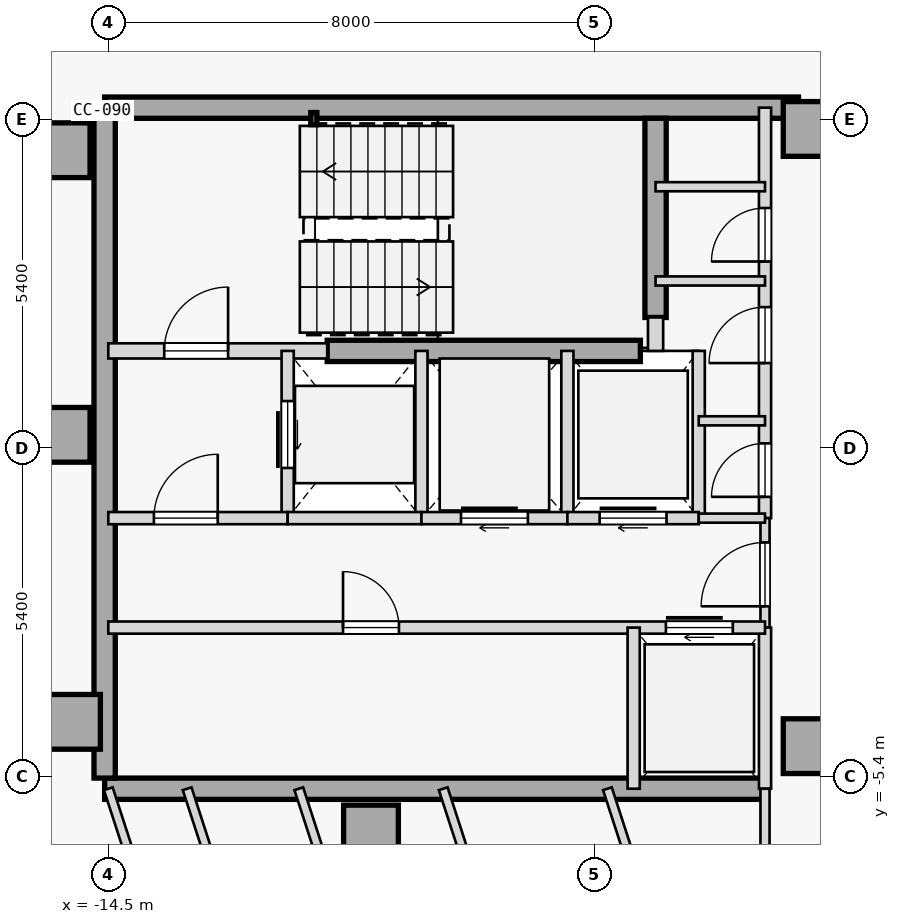
"""IFC4 building model, lengths in metres.
Left out: names, types, materials, properties, quantities, classifications, styles, units other than length and angle.
Written with IfcOpenShell. Run it as: python <this file> out.ifc"""

import sys

from ifc_helpers import new_model, si_unit, direction, frame, frame_2d, origin, origin_2d, place, context, subcontext, project, spatial, rectangle, hollow_rectangle, extrude, element, fill, save


model = new_model("IFC4")
c1 = context("Model", 3, precision=1e-05, world=origin(), true_north=direction((0.0, 1.0)))
c2 = subcontext(c1, "Body", "Model", "MODEL_VIEW")
j1 = project(units=[si_unit("LENGTHUNIT", "METRE"), si_unit("PLANEANGLEUNIT", "RADIAN")], contexts=[c1])
p1 = place(None, origin())
s1 = spatial("IfcSite", under=j1, at=p1, CompositionType="ELEMENT")
p2 = place(p1, origin())
s2 = spatial("IfcBuilding", under=s1, at=p2, CompositionType="ELEMENT")
p3 = place(p2, frame((0.0, 0.0, 224.3)))
s3 = spatial("IfcBuildingStorey", under=s2, at=p3, CompositionType="ELEMENT", Elevation=224.3)
for number, where, z_axis, x_axis in (
    (1, (-15.25, 4.9, 0.0), (0.0, 0.0, 1.0), (1.0, 0.0, 0.0)),
    (2, (-15.25, 0.22, 0.0), (0.0, 0.0, 1.0), (1.0, 0.0, 0.0)),
    (3, (-15.08, -4.5, 0.0), (0.0, 0.0, 1.0), (1.0, 0.0, 0.0)),
    (4, (-10.18, -6.32, 0.0), (0.0, 0.0, 1.0), (1.0, 0.0, 0.0)),
    (5, (-2.95, -4.9, 0.0), (0.0, 0.0, 1.0), (1.0, 0.0, 0.0)),
    (6, (-2.95, 5.25, 0.0), (0.0, 0.0, 1.0), (1.0, 0.0, 0.0)),
):
    element("IfcColumn", number, at=place(p3, frame(where, z_axis=z_axis, x_axis=x_axis)), inside=s3, PredefinedType="COLUMN", context=c2, shape_type="SweptSolid", body=[
        extrude(rectangle(XDim=0.9, YDim=0.9, at=origin_2d()), origin(), (0.0, 0.0, 1.0), 3.35),
    ])
p4 = place(p3, frame((-14.56, 5.6, 0.0), z_axis=(0.0, 0.0, 1.0), x_axis=(1.0, 0.0, 0.0)))
e7 = element("IfcWall", 7, at=p4, inside=s3, PredefinedType="SHEAR", context=c2, shape_type="SweptSolid", body=[
    extrude(rectangle(XDim=11.41, YDim=0.35, at=frame_2d((5.705, 0.0))), origin(), (0.0, 0.0, 1.0), 3.125),
])
p5 = place(p3, frame((-14.56, -5.6, 0.0), z_axis=(0.0, 0.0, 1.0), x_axis=(1.0, 0.0, 0.0)))
e8 = element("IfcWall", 8, at=p5, inside=s3, PredefinedType="SHEAR", context=c2, shape_type="SweptSolid", body=[
    extrude(rectangle(XDim=10.86, YDim=0.35, at=frame_2d((5.43, 0.0))), origin(), (0.0, 0.0, 1.0), 3.125),
])
p6 = place(p3, frame((-14.56, -5.425, 0.0), z_axis=(0.0, 0.0, 1.0), x_axis=(0.0, 1.0, 0.0)))
e9 = element("IfcWall", 9, at=p6, inside=s3, PredefinedType="SHEAR", context=c2, shape_type="SweptSolid", body=[
    extrude(rectangle(XDim=10.85, YDim=0.35, at=frame_2d((5.425, 0.0))), origin(), (0.0, 0.0, 1.0), 3.125),
])
p7 = place(p3, frame((-5.5, 2.15, 0.0), z_axis=(0.0, 0.0, 1.0), x_axis=(0.0, 1.0, 0.0)))
e10 = element("IfcWall", 10, at=p7, inside=s3, PredefinedType="SHEAR", context=c2, shape_type="SweptSolid", body=[
    extrude(rectangle(XDim=3.275, YDim=0.35, at=frame_2d((1.638, 0.0))), origin(), (0.0, 0.0, 1.0), 3.125),
])
p8 = place(p3, frame((-10.9, 1.6, 0.0), z_axis=(0.0, 0.0, 1.0), x_axis=(1.0, 0.0, 0.0)))
e11 = element("IfcWall", 11, at=p8, inside=s3, PredefinedType="SHEAR", context=c2, shape_type="SweptSolid", body=[
    extrude(rectangle(XDim=5.15, YDim=0.35, at=frame_2d((2.575, 0.0))), origin(), (0.0, 0.0, 1.0), 3.125),
])
p9 = place(p3, frame((-11.12, 5.42, 0.0), z_axis=(0.0, 0.0, 1.0), x_axis=(1.0, 0.0, 0.0)))
e12 = element("IfcColumn", 12, at=p9, inside=s3, PredefinedType="COLUMN", context=c2, shape_type="SweptSolid", body=[
    extrude(hollow_rectangle(XDim=0.1, YDim=0.2, WallThickness=0.008, at=origin_2d()), origin(), (0.0, 0.0, 1.0), 3.35),
])
p10 = place(p3, frame((-14.5, 1.6, 0.0), z_axis=(0.0, 0.0, 1.0), x_axis=(1.0, 0.0, 0.0)))
e13 = element("IfcWall", 13, at=p10, inside=s3, PredefinedType="STANDARD", context=c2, shape_type="SweptSolid", body=[
    extrude(rectangle(XDim=3.6, YDim=0.25, at=frame_2d((1.8, 0.0))), origin(), (0.0, 0.0, 1.0), 3.125),
])
p11 = place(p10, frame((0.92, 0.0, 0.0)))
e14 = element("IfcOpeningElement", 14, at=p11, cuts=e13, PredefinedType="OPENING", context=c2, shape_type="SweptSolid", body=[
    extrude(rectangle(XDim=1.05, YDim=2.15, at=frame_2d((0.525, 1.075))), frame((0.0, 0.135, 0.0), z_axis=(0.0, -1.0, 0.0), x_axis=(1.0, 0.0, 0.0)), (0.0, 0.0, 1.0), 0.27),
])
p12 = place(p3, frame((-5.5, 1.6, 0.0), z_axis=(0.0, 0.0, 1.0), x_axis=(0.0, 1.0, 0.0)))
e15 = element("IfcWall", 15, at=p12, inside=s3, PredefinedType="STANDARD", context=c2, shape_type="SweptSolid", body=[
    extrude(rectangle(XDim=0.55, YDim=0.25, at=frame_2d((0.275, 0.0))), origin(), (0.0, 0.0, 1.0), 3.125),
])
p13 = place(p3, frame((-3.7, -1.15, 0.0), z_axis=(0.0, 0.0, 1.0), x_axis=(0.0, 1.0, 0.0)))
e16 = element("IfcWall", 16, at=p13, inside=s3, PredefinedType="STANDARD", context=c2, shape_type="SweptSolid", body=[
    extrude(rectangle(XDim=6.75, YDim=0.2, at=frame_2d((3.375, 0.0))), origin(), (0.0, 0.0, 1.0), 3.125),
])
p14 = place(p13, frame((0.35, 0.0, 0.0)))
e17 = element("IfcOpeningElement", 17, at=p14, cuts=e16, PredefinedType="OPENING", context=c2, shape_type="SweptSolid", body=[
    extrude(rectangle(XDim=0.88, YDim=2.15, at=frame_2d((0.44, 1.075))), frame((0.0, 0.11, 0.0), z_axis=(0.0, -1.0, 0.0), x_axis=(1.0, 0.0, 0.0)), (0.0, 0.0, 1.0), 0.22),
])
p15 = place(p13, frame((2.55, 0.0, 0.0)))
e18 = element("IfcOpeningElement", 18, at=p15, cuts=e16, PredefinedType="OPENING", context=c2, shape_type="SweptSolid", body=[
    extrude(rectangle(XDim=0.92, YDim=2.15, at=frame_2d((0.46, 1.075))), frame((0.0, 0.11, 0.0), z_axis=(0.0, -1.0, 0.0), x_axis=(1.0, 0.0, 0.0)), (0.0, 0.0, 1.0), 0.22),
])
p16 = place(p13, frame((4.22, 0.0, 0.0)))
e19 = element("IfcOpeningElement", 19, at=p16, cuts=e16, PredefinedType="OPENING", context=c2, shape_type="SweptSolid", body=[
    extrude(rectangle(XDim=0.88, YDim=2.15, at=frame_2d((0.44, 1.075))), frame((0.0, 0.11, 0.0), z_axis=(0.0, -1.0, 0.0), x_axis=(1.0, 0.0, 0.0)), (0.0, 0.0, 1.0), 0.22),
])
p17 = place(p3, frame((-3.7, -2.95, 0.0), z_axis=(0.0, 0.0, 1.0), x_axis=(0.0, 1.0, 0.0)))
e20 = element("IfcWall", 20, at=p17, inside=s3, PredefinedType="PARTITIONING", context=c2, shape_type="SweptSolid", body=[
    extrude(rectangle(XDim=1.8, YDim=0.15, at=frame_2d((0.9, 0.0))), origin(), (0.0, 0.0, 1.0), 3.125),
])
p18 = place(p17, frame((0.35, 0.0, 0.0)))
e21 = element("IfcOpeningElement", 21, at=p18, cuts=e20, PredefinedType="OPENING", context=c2, shape_type="SweptSolid", body=[
    extrude(rectangle(XDim=1.05, YDim=2.18, at=frame_2d((0.525, 1.09))), frame((0.0, 0.085, 0.0), z_axis=(0.0, -1.0, 0.0), x_axis=(1.0, 0.0, 0.0)), (0.0, 0.0, 1.0), 0.17),
])
p19 = place(p3, frame((-3.7, -5.6, 0.0), z_axis=(0.0, 0.0, 1.0), x_axis=(0.0, 1.0, 0.0)))
e22 = element("IfcWall", 22, at=p19, inside=s3, PredefinedType="STANDARD", context=c2, shape_type="SweptSolid", body=[
    extrude(rectangle(XDim=2.65, YDim=0.2, at=frame_2d((1.325, 0.0))), origin(), (0.0, 0.0, 1.0), 3.125),
])
p20 = place(p3, frame((-11.55, -1.15, 0.0), z_axis=(0.0, 0.0, 1.0), x_axis=(0.0, 1.0, 0.0)))
e23 = element("IfcWall", 23, at=p20, inside=s3, PredefinedType="STANDARD", context=c2, shape_type="SweptSolid", body=[
    extrude(rectangle(XDim=2.75, YDim=0.2, at=frame_2d((1.375, 0.0))), origin(), (0.0, 0.0, 1.0), 3.125),
])
p21 = place(p20, frame((0.825, 0.0, 0.0)))
e24 = element("IfcOpeningElement", 24, at=p21, cuts=e23, PredefinedType="OPENING", context=c2, shape_type="SweptSolid", body=[
    extrude(rectangle(XDim=1.1, YDim=2.15, at=frame_2d((0.55, 1.075))), frame((0.0, 0.11, 0.0), z_axis=(0.0, -1.0, 0.0), x_axis=(1.0, 0.0, 0.0)), (0.0, 0.0, 1.0), 0.22),
])
p22 = place(p3, frame((-9.35, -1.15, 0.0), z_axis=(0.0, 0.0, 1.0), x_axis=(0.0, 1.0, 0.0)))
e25 = element("IfcWall", 25, at=p22, inside=s3, PredefinedType="STANDARD", context=c2, shape_type="SweptSolid", body=[
    extrude(rectangle(XDim=2.75, YDim=0.2, at=frame_2d((1.375, 0.0))), origin(), (0.0, 0.0, 1.0), 3.125),
])
p23 = place(p3, frame((-14.5, -1.15, 0.0), z_axis=(0.0, 0.0, 1.0), x_axis=(1.0, 0.0, 0.0)))
e26 = element("IfcWall", 26, at=p23, inside=s3, PredefinedType="STANDARD", context=c2, shape_type="SweptSolid", body=[
    extrude(rectangle(XDim=2.95, YDim=0.2, at=frame_2d((1.475, 0.0))), origin(), (0.0, 0.0, 1.0), 3.125),
])
p24 = place(p23, frame((0.75, 0.0, 0.0)))
e27 = element("IfcOpeningElement", 27, at=p24, cuts=e26, PredefinedType="OPENING", context=c2, shape_type="SweptSolid", body=[
    extrude(rectangle(XDim=1.05, YDim=2.18, at=frame_2d((0.525, 1.09))), frame((0.0, 0.11, 0.0), z_axis=(0.0, -1.0, 0.0), x_axis=(1.0, 0.0, 0.0)), (0.0, 0.0, 1.0), 0.22),
])
p25 = place(p3, frame((-11.55, -1.15, 0.0), z_axis=(0.0, 0.0, 1.0), x_axis=(1.0, 0.0, 0.0)))
e28 = element("IfcWall", 28, at=p25, inside=s3, PredefinedType="STANDARD", context=c2, shape_type="SweptSolid", body=[
    extrude(rectangle(XDim=2.2, YDim=0.2, at=frame_2d((1.1, 0.0))), origin(), (0.0, 0.0, 1.0), 3.125),
])
p26 = place(p3, frame((-6.95, -1.15, 0.0), z_axis=(0.0, 0.0, 1.0), x_axis=(0.0, 1.0, 0.0)))
e29 = element("IfcWall", 29, at=p26, inside=s3, PredefinedType="STANDARD", context=c2, shape_type="SweptSolid", body=[
    extrude(rectangle(XDim=2.75, YDim=0.2, at=frame_2d((1.375, 0.0))), origin(), (0.0, 0.0, 1.0), 3.125),
])
p27 = place(p3, frame((-9.35, -1.15, 0.0), z_axis=(0.0, 0.0, 1.0), x_axis=(1.0, 0.0, 0.0)))
e30 = element("IfcWall", 30, at=p27, inside=s3, PredefinedType="STANDARD", context=c2, shape_type="SweptSolid", body=[
    extrude(rectangle(XDim=2.4, YDim=0.2, at=frame_2d((1.2, 0.0))), origin(), (0.0, 0.0, 1.0), 3.125),
])
p28 = place(p27, frame((0.65, 0.0, 0.0)))
e31 = element("IfcOpeningElement", 31, at=p28, cuts=e30, PredefinedType="OPENING", context=c2, shape_type="SweptSolid", body=[
    extrude(rectangle(XDim=1.1, YDim=2.15, at=frame_2d((0.55, 1.075))), frame((0.0, 0.11, 0.0), z_axis=(0.0, -1.0, 0.0), x_axis=(1.0, 0.0, 0.0)), (0.0, 0.0, 1.0), 0.22),
])
p29 = place(p3, frame((-4.79, -1.15, 0.0), z_axis=(0.0, 0.0, 1.0), x_axis=(0.0, 1.0, 0.0)))
e32 = element("IfcWall", 32, at=p29, inside=s3, PredefinedType="STANDARD", context=c2, shape_type="SweptSolid", body=[
    extrude(rectangle(XDim=2.75, YDim=0.2, at=frame_2d((1.375, 0.0))), origin(), (0.0, 0.0, 1.0), 3.125),
])
p30 = place(p3, frame((-6.95, -1.15, 0.0), z_axis=(0.0, 0.0, 1.0), x_axis=(1.0, 0.0, 0.0)))
e33 = element("IfcWall", 33, at=p30, inside=s3, PredefinedType="STANDARD", context=c2, shape_type="SweptSolid", body=[
    extrude(rectangle(XDim=2.16, YDim=0.2, at=frame_2d((1.08, 0.0))), origin(), (0.0, 0.0, 1.0), 3.125),
])
p31 = place(p30, frame((0.53, 0.0, 0.0)))
e34 = element("IfcOpeningElement", 34, at=p31, cuts=e33, PredefinedType="OPENING", context=c2, shape_type="SweptSolid", body=[
    extrude(rectangle(XDim=1.1, YDim=2.15, at=frame_2d((0.55, 1.075))), frame((0.0, 0.11, 0.0), z_axis=(0.0, -1.0, 0.0), x_axis=(1.0, 0.0, 0.0)), (0.0, 0.0, 1.0), 0.22),
])
p32 = place(p3, frame((-4.79, -1.15, 0.0), z_axis=(0.0, 0.0, 1.0), x_axis=(1.0, 0.0, 0.0)))
e35 = element("IfcWall", 35, at=p32, inside=s3, PredefinedType="PARTITIONING", context=c2, shape_type="SweptSolid", body=[
    extrude(rectangle(XDim=1.09, YDim=0.15, at=frame_2d((0.545, 0.0))), origin(), (0.0, 0.0, 1.0), 3.125),
])
p33 = place(p3, frame((-14.5, -2.95, 0.0), z_axis=(0.0, 0.0, 1.0), x_axis=(1.0, 0.0, 0.0)))
e36 = element("IfcWall", 36, at=p33, inside=s3, PredefinedType="STANDARD", context=c2, shape_type="SweptSolid", body=[
    extrude(rectangle(XDim=10.8, YDim=0.2, at=frame_2d((5.4, 0.0))), origin(), (0.0, 0.0, 1.0), 3.125),
])
p34 = place(p33, frame((9.17, 0.0, 0.0)))
e37 = element("IfcOpeningElement", 37, at=p34, cuts=e36, PredefinedType="OPENING", context=c2, shape_type="SweptSolid", body=[
    extrude(rectangle(XDim=1.1, YDim=2.15, at=frame_2d((0.55, 1.075))), frame((0.0, 0.11, 0.0), z_axis=(0.0, -1.0, 0.0), x_axis=(1.0, 0.0, 0.0)), (0.0, 0.0, 1.0), 0.22),
])
p35 = place(p33, frame((3.86, 0.0, 0.0)))
e38 = element("IfcOpeningElement", 38, at=p35, cuts=e36, PredefinedType="OPENING", context=c2, shape_type="SweptSolid", body=[
    extrude(rectangle(XDim=0.92, YDim=2.15, at=frame_2d((0.46, 1.075))), frame((0.0, 0.11, 0.0), z_axis=(0.0, -1.0, 0.0), x_axis=(1.0, 0.0, 0.0)), (0.0, 0.0, 1.0), 0.22),
])
p36 = place(p3, frame((-5.86, -5.6, 0.0), z_axis=(0.0, 0.0, 1.0), x_axis=(0.0, 1.0, 0.0)))
e39 = element("IfcWall", 39, at=p36, inside=s3, PredefinedType="STANDARD", context=c2, shape_type="SweptSolid", body=[
    extrude(rectangle(XDim=2.65, YDim=0.2, at=frame_2d((1.325, 0.0))), origin(), (0.0, 0.0, 1.0), 3.125),
])
p37 = place(p3, frame((-5.5, 4.3, 0.0), z_axis=(0.0, 0.0, 1.0), x_axis=(1.0, 0.0, 0.0)))
e40 = element("IfcWall", 40, at=p37, inside=s3, PredefinedType="PARTITIONING", context=c2, shape_type="SweptSolid", body=[
    extrude(rectangle(XDim=1.8, YDim=0.15, at=frame_2d((0.9, 0.0))), origin(), (0.0, 0.0, 1.0), 3.125),
])
p38 = place(p3, frame((-4.79, 0.45, 0.0), z_axis=(0.0, 0.0, 1.0), x_axis=(1.0, 0.0, 0.0)))
e41 = element("IfcWall", 41, at=p38, inside=s3, PredefinedType="PARTITIONING", context=c2, shape_type="SweptSolid", body=[
    extrude(rectangle(XDim=1.09, YDim=0.15, at=frame_2d((0.545, 0.0))), origin(), (0.0, 0.0, 1.0), 3.125),
])
p39 = place(p3, frame((-5.5, 2.75, 0.0), z_axis=(0.0, 0.0, 1.0), x_axis=(1.0, 0.0, 0.0)))
e42 = element("IfcWall", 42, at=p39, inside=s3, PredefinedType="PARTITIONING", context=c2, shape_type="SweptSolid", body=[
    extrude(rectangle(XDim=1.8, YDim=0.15, at=frame_2d((0.9, 0.0))), origin(), (0.0, 0.0, 1.0), 3.125),
])
p40 = place(p3, frame((-17.202, 6.426, 0.0), z_axis=(0.0, 0.0, 1.0), x_axis=(0.951035595692, 0.309081373955, 0.0)))
e43 = element("IfcWall", 43, at=p40, inside=s3, PredefinedType="PARTITIONING", context=c2, shape_type="SweptSolid", body=[
    extrude(rectangle(XDim=2.35, YDim=0.15, at=frame_2d((1.175, 0.0))), origin(), (0.0, 0.0, 1.0), 3.125),
])
p41 = place(p3, frame((-3.7, -11.514, 0.0), z_axis=(0.0, 0.0, 1.0), x_axis=(-8.2572974e-05, 0.999999996591, 0.0)))
e44 = element("IfcWall", 44, at=p41, inside=s3, PredefinedType="PARTITIONING", context=c2, shape_type="SweptSolid", body=[
    extrude(rectangle(XDim=5.913, YDim=0.15, at=frame_2d((2.957, 0.0))), origin(), (0.0, 0.0, 1.0), 3.125),
])
p42 = place(p41, frame((2.497, 0.0, 0.0)))
e45 = element("IfcOpeningElement", 45, at=p42, cuts=e44, PredefinedType="OPENING", context=c2, shape_type="SweptSolid", body=[
    extrude(rectangle(XDim=0.92, YDim=2.15, at=frame_2d((0.46, 1.075))), frame((0.0, 0.085, 0.0), z_axis=(0.0, -1.0, 0.0), x_axis=(1.0, 0.0, 0.0)), (0.0, 0.0, 1.0), 0.17),
])
p43 = place(p3, frame((-30.663, -9.757, 0.0), z_axis=(0.0, 0.0, 1.0), x_axis=(0.951058192995, 0.309011833974, 0.0)))
e46 = element("IfcWall", 46, at=p43, inside=s3, PredefinedType="PARTITIONING", context=c2, shape_type="SweptSolid", body=[
    extrude(rectangle(XDim=16.657, YDim=0.15, at=frame_2d((8.329, 0.0))), origin(), (0.0, 0.0, 1.0), 3.125),
])
p44 = place(p3, frame((-13.488, -8.713, 0.0), z_axis=(0.0, 0.0, 1.0), x_axis=(-0.309082700143, 0.951035164687, 0.0)))
e47 = element("IfcWall", 47, at=p44, inside=s3, PredefinedType="PARTITIONING", context=c2, shape_type="SweptSolid", body=[
    extrude(rectangle(XDim=3.274, YDim=0.15, at=frame_2d((1.637, 0.0))), origin(), (0.0, 0.0, 1.0), 3.125),
])
p45 = place(p3, frame((-10.558, -13.742, 0.0), z_axis=(0.0, 0.0, 1.0), x_axis=(-0.309023521796, 0.951054395383, 0.0)))
e48 = element("IfcWall", 48, at=p45, inside=s3, PredefinedType="PARTITIONING", context=c2, shape_type="SweptSolid", body=[
    extrude(rectangle(XDim=8.561, YDim=0.15, at=frame_2d((4.28, 0.0))), origin(), (0.0, 0.0, 1.0), 3.125),
])
p46 = place(p3, frame((-8.897, -13.202, 0.0), z_axis=(0.0, 0.0, 1.0), x_axis=(-0.309008036968, 0.951059426687, 0.0)))
e49 = element("IfcWall", 49, at=p46, inside=s3, PredefinedType="PARTITIONING", context=c2, shape_type="SweptSolid", body=[
    extrude(rectangle(XDim=7.994, YDim=0.15, at=frame_2d((3.997, 0.0))), origin(), (0.0, 0.0, 1.0), 3.125),
])
p47 = place(p3, frame((-6.749, -12.504, 0.0), z_axis=(0.0, 0.0, 1.0), x_axis=(-0.309005471061, 0.95106026037, 0.0)))
e50 = element("IfcWall", 50, at=p47, inside=s3, PredefinedType="PARTITIONING", context=c2, shape_type="SweptSolid", body=[
    extrude(rectangle(XDim=7.26, YDim=0.15, at=frame_2d((3.63, 0.0))), origin(), (0.0, 0.0, 1.0), 3.125),
])
p48 = place(p3, frame((-4.306, -11.711, 0.0), z_axis=(0.0, 0.0, 1.0), x_axis=(-0.309048266124, 0.951046354919, 0.0)))
e51 = element("IfcWall", 51, at=p48, inside=s3, PredefinedType="PARTITIONING", context=c2, shape_type="SweptSolid", body=[
    extrude(rectangle(XDim=6.425, YDim=0.15, at=frame_2d((3.212, 0.0))), origin(), (0.0, 0.0, 1.0), 3.125),
])
p49 = place(p11, origin())
e52 = element("IfcDoor", 52, at=p49, inside=s3, OperationType="SINGLE_SWING_RIGHT", PredefinedType="DOOR", context=c2, shape_type="SweptSolid", body=[
    extrude(rectangle(XDim=1.05, YDim=2.15, at=frame_2d((0.525, 1.075))), frame((0.0, 0.025, 0.0), z_axis=(0.0, -1.0, 0.0), x_axis=(1.0, 0.0, 0.0)), (0.0, 0.0, 1.0), 0.05),
])
fill(e14, e52)
p50 = place(p24, origin())
e53 = element("IfcDoor", 53, at=p50, inside=s3, OperationType="SINGLE_SWING_RIGHT", PredefinedType="DOOR", context=c2, shape_type="SweptSolid", body=[
    extrude(rectangle(XDim=1.05, YDim=2.18, at=frame_2d((0.525, 1.09))), frame((0.0, 0.025, 0.0), z_axis=(0.0, -1.0, 0.0), x_axis=(1.0, 0.0, 0.0)), (0.0, 0.0, 1.0), 0.05),
])
fill(e27, e53)
p51 = place(p18, origin())
e54 = element("IfcDoor", 54, at=p51, inside=s3, OperationType="SINGLE_SWING_LEFT", PredefinedType="DOOR", context=c2, shape_type="SweptSolid", body=[
    extrude(rectangle(XDim=1.05, YDim=2.18, at=frame_2d((0.525, 1.09))), frame((0.0, 0.025, 0.0), z_axis=(0.0, -1.0, 0.0), x_axis=(1.0, 0.0, 0.0)), (0.0, 0.0, 1.0), 0.05),
])
fill(e21, e54)
p52 = place(p21, origin())
e55 = element("IfcDoor", 55, at=p52, inside=s3, OperationType="SLIDING_TO_RIGHT", PredefinedType="DOOR", context=c2, shape_type="SweptSolid", body=[
    extrude(rectangle(XDim=1.1, YDim=2.15, at=frame_2d((0.55, 1.075))), frame((0.0, 0.025, 0.0), z_axis=(0.0, -1.0, 0.0), x_axis=(1.0, 0.0, 0.0)), (0.0, 0.0, 1.0), 0.05),
])
fill(e24, e55)
p53 = place(p28, origin())
e56 = element("IfcDoor", 56, at=p53, inside=s3, OperationType="SLIDING_TO_RIGHT", PredefinedType="DOOR", context=c2, shape_type="SweptSolid", body=[
    extrude(rectangle(XDim=1.1, YDim=2.15, at=frame_2d((0.55, 1.075))), frame((0.0, 0.025, 0.0), z_axis=(0.0, -1.0, 0.0), x_axis=(1.0, 0.0, 0.0)), (0.0, 0.0, 1.0), 0.05),
])
fill(e31, e56)
p54 = place(p31, origin())
e57 = element("IfcDoor", 57, at=p54, inside=s3, OperationType="SLIDING_TO_RIGHT", PredefinedType="DOOR", context=c2, shape_type="SweptSolid", body=[
    extrude(rectangle(XDim=1.1, YDim=2.15, at=frame_2d((0.55, 1.075))), frame((0.0, 0.025, 0.0), z_axis=(0.0, -1.0, 0.0), x_axis=(1.0, 0.0, 0.0)), (0.0, 0.0, 1.0), 0.05),
])
fill(e34, e57)
p55 = place(p34, origin())
e58 = element("IfcDoor", 58, at=p55, inside=s3, OperationType="SLIDING_TO_RIGHT", PredefinedType="DOOR", context=c2, shape_type="SweptSolid", body=[
    extrude(rectangle(XDim=1.1, YDim=2.15, at=frame_2d((0.55, 1.075))), frame((0.0, 0.025, 0.0), z_axis=(0.0, -1.0, 0.0), x_axis=(1.0, 0.0, 0.0)), (0.0, 0.0, 1.0), 0.05),
])
fill(e37, e58)
p56 = place(p35, origin())
e59 = element("IfcDoor", 59, at=p56, inside=s3, OperationType="SINGLE_SWING_LEFT", PredefinedType="DOOR", context=c2, shape_type="SweptSolid", body=[
    extrude(rectangle(XDim=0.92, YDim=2.15, at=frame_2d((0.46, 1.075))), frame((0.0, 0.025, 0.0), z_axis=(0.0, -1.0, 0.0), x_axis=(1.0, 0.0, 0.0)), (0.0, 0.0, 1.0), 0.05),
])
fill(e38, e59)
p57 = place(p14, origin())
e60 = element("IfcDoor", 60, at=p57, inside=s3, OperationType="SINGLE_SWING_LEFT", PredefinedType="DOOR", context=c2, shape_type="SweptSolid", body=[
    extrude(rectangle(XDim=0.88, YDim=2.15, at=frame_2d((0.44, 1.075))), frame((0.0, 0.025, 0.0), z_axis=(0.0, -1.0, 0.0), x_axis=(1.0, 0.0, 0.0)), (0.0, 0.0, 1.0), 0.05),
])
fill(e17, e60)
p58 = place(p15, origin())
e61 = element("IfcDoor", 61, at=p58, inside=s3, OperationType="SINGLE_SWING_LEFT", PredefinedType="DOOR", context=c2, shape_type="SweptSolid", body=[
    extrude(rectangle(XDim=0.92, YDim=2.15, at=frame_2d((0.46, 1.075))), frame((0.0, 0.025, 0.0), z_axis=(0.0, -1.0, 0.0), x_axis=(1.0, 0.0, 0.0)), (0.0, 0.0, 1.0), 0.05),
])
fill(e18, e61)
p59 = place(p16, origin())
e62 = element("IfcDoor", 62, at=p59, inside=s3, OperationType="SINGLE_SWING_LEFT", PredefinedType="DOOR", context=c2, shape_type="SweptSolid", body=[
    extrude(rectangle(XDim=0.88, YDim=2.15, at=frame_2d((0.44, 1.075))), frame((0.0, 0.025, 0.0), z_axis=(0.0, -1.0, 0.0), x_axis=(1.0, 0.0, 0.0)), (0.0, 0.0, 1.0), 0.05),
])
fill(e19, e62)
save(model, sys.argv[1])
